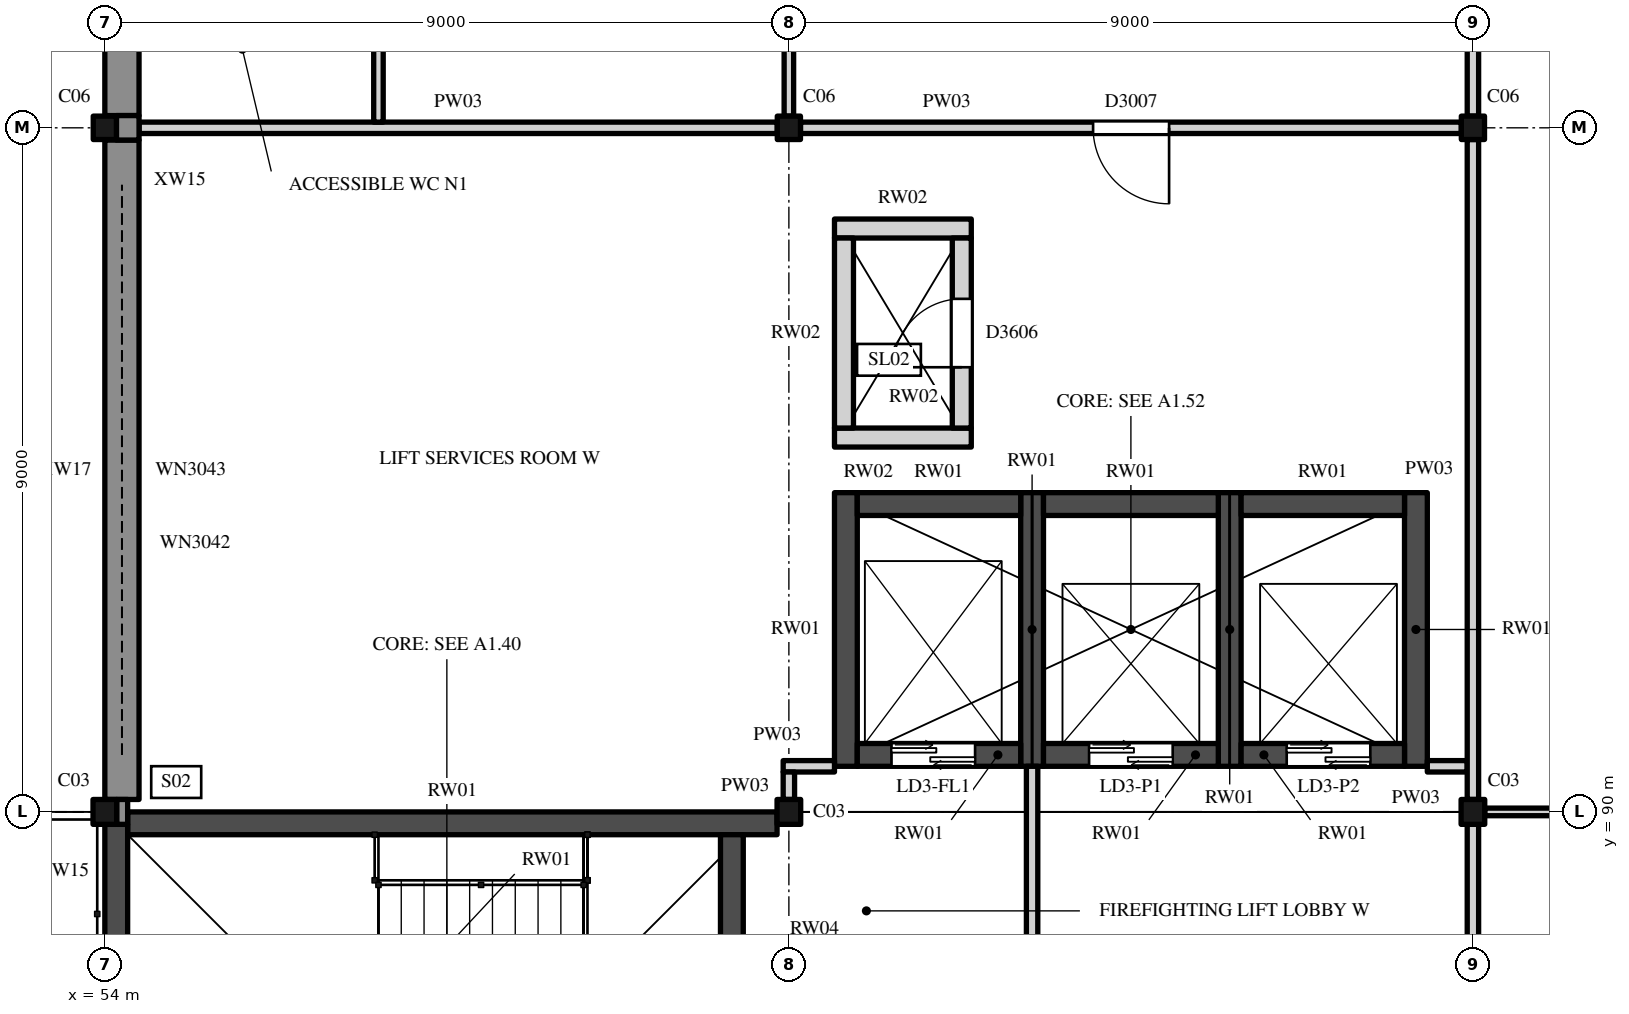
"""IFC4 building model, lengths in metres.
Left out: names, types, materials, properties, quantities, classifications, styles, units other than length and angle.
Written with IfcOpenShell. Run it as: python <this file> out.ifc"""

import sys

from ifc_helpers import new_model, si_unit, direction, frame, frame_2d, origin, origin_2d, place, context, subcontext, project, spatial, rectangle, i_section, extrude, element, fill, save


model = new_model("IFC4")
c1 = context("Model", 3, precision=1e-05, world=origin(), true_north=direction((0.0, 1.0)))
c2 = subcontext(c1, "Body", "Model", "MODEL_VIEW")
j1 = project(units=[si_unit("LENGTHUNIT", "METRE"), si_unit("PLANEANGLEUNIT", "RADIAN")], contexts=[c1])
p1 = place(None, origin())
s1 = spatial("IfcSite", under=j1, at=p1, CompositionType="ELEMENT")
p2 = place(p1, origin())
s2 = spatial("IfcBuilding", under=s1, at=p2, CompositionType="ELEMENT")
p3 = place(p2, frame((0.0, 0.0, 16.0)))
s3 = spatial("IfcBuildingStorey", under=s2, at=p3, CompositionType="ELEMENT", Elevation=16.0)
for number, where, z_axis, x_axis in (
    (1, (54.0, 90.0, 0.0), (0.0, 0.0, 1.0), (1.0, 0.0, 0.0)),
    (2, (63.0, 90.0, 0.0), (0.0, 0.0, 1.0), (1.0, 0.0, 0.0)),
    (3, (72.0, 90.0, 0.0), (0.0, 0.0, 1.0), (1.0, 0.0, 0.0)),
):
    element("IfcColumn", number, at=place(p3, frame(where, z_axis=z_axis, x_axis=x_axis)), inside=s3, PredefinedType="COLUMN", context=c2, shape_type="SweptSolid", body=[
        extrude(i_section(OverallWidth=0.311, OverallDepth=0.327, WebThickness=0.016, FlangeThickness=0.025, FilletRadius=0.017, at=origin_2d()), origin(), (0.0, 0.0, 1.0), 10.0),
    ])
for number, where, z_axis, x_axis in (
    (4, (54.0, 99.0, 0.0), (0.0, 0.0, 1.0), (1.0, 0.0, 0.0)),
    (5, (63.0, 99.0, 0.0), (0.0, 0.0, 1.0), (1.0, 0.0, 0.0)),
    (6, (72.0, 99.0, 0.0), (0.0, 0.0, 1.0), (1.0, 0.0, 0.0)),
):
    element("IfcColumn", number, at=place(p3, frame(where, z_axis=z_axis, x_axis=x_axis)), inside=s3, PredefinedType="COLUMN", context=c2, shape_type="SweptSolid", body=[
        extrude(i_section(OverallWidth=0.305, OverallDepth=0.308, WebThickness=0.01, FlangeThickness=0.015, FilletRadius=0.017, at=origin_2d()), origin(), (0.0, 0.0, 1.0), 10.0),
    ])
p4 = place(p3, frame((54.3, 89.85, 0.0), z_axis=(0.0, 0.0, 1.0), x_axis=(1.0, 0.0, 0.0)))
e7 = element("IfcWall", 7, at=p4, inside=s3, PredefinedType="SHEAR", context=c2, shape_type="SweptSolid", body=[
    extrude(rectangle(XDim=8.544, YDim=0.3, at=frame_2d((4.272, 0.0))), origin(), (0.0, 0.0, 1.0), 10.0),
])
p5 = place(p3, frame((54.15, 81.125, 0.0), z_axis=(0.0, 0.0, 1.0), x_axis=(0.0, 1.0, 0.0)))
e8 = element("IfcWall", 8, at=p5, inside=s3, PredefinedType="SHEAR", context=c2, shape_type="SweptSolid", body=[
    extrude(rectangle(XDim=8.711, YDim=0.3, at=frame_2d((4.356, 0.0))), origin(), (0.0, 0.0, 1.0), 10.0),
])
p6 = place(p3, frame((62.25, 81.9, 0.0), z_axis=(0.0, 0.0, 1.0), x_axis=(0.0, 1.0, 0.0)))
e9 = element("IfcWall", 9, at=p6, inside=s3, PredefinedType="SHEAR", context=c2, shape_type="SweptSolid", body=[
    extrude(rectangle(XDim=7.8, YDim=0.3, at=frame_2d((3.9, 0.0))), origin(), (0.0, 0.0, 1.0), 10.0),
])
p7 = place(p6, frame((3.0, 0.0, 0.0)))
e10 = element("IfcOpeningElement", 10, at=p7, cuts=e9, PredefinedType="OPENING", context=c2, shape_type="SweptSolid", body=[
    extrude(rectangle(XDim=1.2, YDim=2.1, at=frame_2d((0.6, 1.05))), frame((0.0, 0.16, 0.0), z_axis=(0.0, -1.0, 0.0), x_axis=(1.0, 0.0, 0.0)), (0.0, 0.0, 1.0), 0.32),
])
for number, where, z_axis, x_axis in (
    (11, (63.75, 90.6, 0.0), (0.0, 0.0, 1.0), (0.0, 1.0, 0.0)),
    (12, (66.2, 90.6, 0.0), (0.0, 0.0, 1.0), (0.0, 1.0, 0.0)),
    (13, (68.8, 90.6, 0.0), (0.0, 0.0, 1.0), (0.0, 1.0, 0.0)),
    (14, (71.25, 90.6, 0.0), (0.0, 0.0, 1.0), (0.0, 1.0, 0.0)),
):
    element("IfcWall", number, at=place(p3, frame(where, z_axis=z_axis, x_axis=x_axis)), inside=s3, PredefinedType="SHEAR", context=c2, shape_type="SweptSolid", body=[
        extrude(rectangle(XDim=3.6, YDim=0.3, at=frame_2d((1.8, 0.0))), origin(), (0.0, 0.0, 1.0), 10.0),
    ])
p8 = place(p3, frame((63.9, 90.75, 0.0), z_axis=(0.0, 0.0, 1.0), x_axis=(1.0, 0.0, 0.0)))
e15 = element("IfcWall", 15, at=p8, inside=s3, PredefinedType="SHEAR", context=c2, shape_type="SweptSolid", body=[
    extrude(rectangle(XDim=2.15, YDim=0.3, at=frame_2d((1.075, 0.0))), origin(), (0.0, 0.0, 1.0), 10.0),
])
p9 = place(p8, frame((0.45, 0.0, 0.0)))
e16 = element("IfcOpeningElement", 16, at=p9, cuts=e15, PredefinedType="OPENING", context=c2, shape_type="SweptSolid", body=[
    extrude(rectangle(XDim=1.1, YDim=2.1, at=frame_2d((0.55, 1.05))), frame((0.0, 0.16, 0.0), z_axis=(0.0, -1.0, 0.0), x_axis=(1.0, 0.0, 0.0)), (0.0, 0.0, 1.0), 0.32),
])
p10 = place(p3, frame((63.9, 94.05, 0.0), z_axis=(0.0, 0.0, 1.0), x_axis=(1.0, 0.0, 0.0)))
e17 = element("IfcWall", 17, at=p10, inside=s3, PredefinedType="SHEAR", context=c2, shape_type="SweptSolid", body=[
    extrude(rectangle(XDim=2.15, YDim=0.3, at=frame_2d((1.075, 0.0))), origin(), (0.0, 0.0, 1.0), 10.0),
])
p11 = place(p3, frame((66.35, 90.75, 0.0), z_axis=(0.0, 0.0, 1.0), x_axis=(1.0, 0.0, 0.0)))
e18 = element("IfcWall", 18, at=p11, inside=s3, PredefinedType="SHEAR", context=c2, shape_type="SweptSolid", body=[
    extrude(rectangle(XDim=2.3, YDim=0.3, at=frame_2d((1.15, 0.0))), origin(), (0.0, 0.0, 1.0), 10.0),
])
p12 = place(p11, frame((0.6, 0.0, 0.0)))
e19 = element("IfcOpeningElement", 19, at=p12, cuts=e18, PredefinedType="OPENING", context=c2, shape_type="SweptSolid", body=[
    extrude(rectangle(XDim=1.1, YDim=2.1, at=frame_2d((0.55, 1.05))), frame((0.0, 0.16, 0.0), z_axis=(0.0, -1.0, 0.0), x_axis=(1.0, 0.0, 0.0)), (0.0, 0.0, 1.0), 0.32),
])
p13 = place(p3, frame((66.35, 94.05, 0.0), z_axis=(0.0, 0.0, 1.0), x_axis=(1.0, 0.0, 0.0)))
e20 = element("IfcWall", 20, at=p13, inside=s3, PredefinedType="SHEAR", context=c2, shape_type="SweptSolid", body=[
    extrude(rectangle(XDim=2.3, YDim=0.3, at=frame_2d((1.15, 0.0))), origin(), (0.0, 0.0, 1.0), 10.0),
])
p14 = place(p3, frame((68.95, 90.75, 0.0), z_axis=(0.0, 0.0, 1.0), x_axis=(1.0, 0.0, 0.0)))
e21 = element("IfcWall", 21, at=p14, inside=s3, PredefinedType="SHEAR", context=c2, shape_type="SweptSolid", body=[
    extrude(rectangle(XDim=2.15, YDim=0.3, at=frame_2d((1.075, 0.0))), origin(), (0.0, 0.0, 1.0), 10.0),
])
p15 = place(p14, frame((0.6, 0.0, 0.0)))
e22 = element("IfcOpeningElement", 22, at=p15, cuts=e21, PredefinedType="OPENING", context=c2, shape_type="SweptSolid", body=[
    extrude(rectangle(XDim=1.1, YDim=2.1, at=frame_2d((0.55, 1.05))), frame((0.0, 0.16, 0.0), z_axis=(0.0, -1.0, 0.0), x_axis=(1.0, 0.0, 0.0)), (0.0, 0.0, 1.0), 0.32),
])
p16 = place(p3, frame((68.95, 94.05, 0.0), z_axis=(0.0, 0.0, 1.0), x_axis=(1.0, 0.0, 0.0)))
e23 = element("IfcWall", 23, at=p16, inside=s3, PredefinedType="SHEAR", context=c2, shape_type="SweptSolid", body=[
    extrude(rectangle(XDim=2.15, YDim=0.3, at=frame_2d((1.075, 0.0))), origin(), (0.0, 0.0, 1.0), 10.0),
])
for number, where, z_axis, x_axis in (
    (24, (63.6, 94.925, 0.0), (0.0, 0.0, 1.0), (1.0, 0.0, 0.0)),
    (25, (63.6, 97.675, 0.0), (0.0, 0.0, 1.0), (1.0, 0.0, 0.0)),
):
    element("IfcWall", number, at=place(p3, frame(where, z_axis=z_axis, x_axis=x_axis)), inside=s3, PredefinedType="STANDARD", context=c2, shape_type="SweptSolid", body=[
        extrude(rectangle(XDim=1.8, YDim=0.25, at=frame_2d((0.9, 0.0))), origin(), (0.0, 0.0, 1.0), 10.0),
    ])
p17 = place(p3, frame((63.725, 95.05, 0.0), z_axis=(0.0, 0.0, 1.0), x_axis=(0.0, 1.0, 0.0)))
e26 = element("IfcWall", 26, at=p17, inside=s3, PredefinedType="STANDARD", context=c2, shape_type="SweptSolid", body=[
    extrude(rectangle(XDim=2.5, YDim=0.25, at=frame_2d((1.25, 0.0))), origin(), (0.0, 0.0, 1.0), 10.0),
])
p18 = place(p3, frame((65.275, 95.05, 0.0), z_axis=(0.0, 0.0, 1.0), x_axis=(0.0, 1.0, 0.0)))
e27 = element("IfcWall", 27, at=p18, inside=s3, PredefinedType="STANDARD", context=c2, shape_type="SweptSolid", body=[
    extrude(rectangle(XDim=2.5, YDim=0.25, at=frame_2d((1.25, 0.0))), origin(), (0.0, 0.0, 1.0), 10.0),
])
p19 = place(p18, frame((0.8, 0.0, 0.0)))
e28 = element("IfcOpeningElement", 28, at=p19, cuts=e27, PredefinedType="OPENING", context=c2, shape_type="SweptSolid", body=[
    extrude(rectangle(XDim=0.9, YDim=2.1, at=frame_2d((0.45, 1.05))), frame((0.0, 0.135, 0.0), z_axis=(0.0, -1.0, 0.0), x_axis=(1.0, 0.0, 0.0)), (0.0, 0.0, 1.0), 0.27),
])
p20 = place(p3, frame((54.225, 90.164, 0.0), z_axis=(0.0, 0.0, 1.0), x_axis=(0.0, 1.0, 0.0)))
e29 = element("IfcWall", 29, at=p20, inside=s3, PredefinedType="SOLIDWALL", context=c2, shape_type="SweptSolid", body=[
    extrude(rectangle(XDim=8.676, YDim=0.45, at=frame_2d((4.338, 0.0))), origin(), (0.0, 0.0, 1.0), 9.371),
])
p21 = place(p20, frame((0.586, 0.0, 6.4)))
e30 = element("IfcOpeningElement", 30, at=p21, cuts=e29, PredefinedType="OPENING", context=c2, shape_type="SweptSolid", body=[
    extrude(rectangle(XDim=7.5, YDim=1.2, at=frame_2d((3.75, 0.6))), frame((0.0, 0.235, 0.0), z_axis=(0.0, -1.0, 0.0), x_axis=(1.0, 0.0, 0.0)), (0.0, 0.0, 1.0), 0.47),
])
p22 = place(p20, frame((0.586, 0.0, 1.6)))
e31 = element("IfcOpeningElement", 31, at=p22, cuts=e29, PredefinedType="OPENING", context=c2, shape_type="SweptSolid", body=[
    extrude(rectangle(XDim=7.5, YDim=1.2, at=frame_2d((3.75, 0.6))), frame((0.0, 0.235, 0.0), z_axis=(0.0, -1.0, 0.0), x_axis=(1.0, 0.0, 0.0)), (0.0, 0.0, 1.0), 0.47),
])
p23 = place(p3, frame((54.225, 99.161, 0.0), z_axis=(0.0, 0.0, 1.0), x_axis=(0.0, 1.0, 0.0)))
e32 = element("IfcWall", 32, at=p23, inside=s3, PredefinedType="SOLIDWALL", context=c2, shape_type="SweptSolid", body=[
    extrude(rectangle(XDim=8.678, YDim=0.45, at=frame_2d((4.339, 0.0))), origin(), (0.0, 0.0, 1.0), 9.371),
])
p24 = place(p3, frame((54.228, 89.836, 0.0), z_axis=(0.0, 0.0, 1.0), x_axis=(0.0, 1.0, 0.0)))
e33 = element("IfcWall", 33, at=p24, inside=s3, PredefinedType="SOLIDWALL", context=c2, shape_type="SweptSolid", body=[
    extrude(rectangle(XDim=0.327, YDim=0.145, at=frame_2d((0.164, 0.0))), origin(), (0.0, 0.0, 1.0), 10.0),
])
p25 = place(p3, frame((54.301, 98.839, 0.0), z_axis=(0.0, 0.0, 1.0), x_axis=(0.0, 1.0, 0.0)))
e34 = element("IfcWall", 34, at=p25, inside=s3, PredefinedType="SOLIDWALL", context=c2, shape_type="SweptSolid", body=[
    extrude(rectangle(XDim=0.322, YDim=0.298, at=frame_2d((0.161, 0.0))), origin(), (0.0, 0.0, 1.0), 9.371),
])
p26 = place(p3, frame((72.156, 90.0, 0.0), z_axis=(0.0, 0.0, 1.0), x_axis=(1.0, 0.0, 0.0)))
e35 = element("IfcWall", 35, at=p26, inside=s3, PredefinedType="PARTITIONING", context=c2, shape_type="SweptSolid", body=[
    extrude(rectangle(XDim=8.689, YDim=0.1, at=frame_2d((4.344, 0.0))), origin(), (0.0, 0.0, 1.0), 9.473),
])
p27 = place(p26, frame((3.45, 0.0, 0.0)))
e36 = element("IfcOpeningElement", 36, at=p27, cuts=e35, PredefinedType="OPENING", context=c2, shape_type="SweptSolid", body=[
    extrude(rectangle(XDim=1.8, YDim=2.4, at=frame_2d((0.9, 1.2))), frame((0.0, 0.06, 0.0), z_axis=(0.0, -1.0, 0.0), x_axis=(1.0, 0.0, 0.0)), (0.0, 0.0, 1.0), 0.12),
])
p28 = place(p3, frame((62.925, 90.6, 0.0), z_axis=(0.0, 0.0, 1.0), x_axis=(1.0, 0.0, 0.0)))
e37 = element("IfcWall", 37, at=p28, inside=s3, PredefinedType="PARTITIONING", context=c2, shape_type="SweptSolid", body=[
    extrude(rectangle(XDim=0.675, YDim=0.15, at=frame_2d((0.337, 0.0))), origin(), (0.0, 0.0, 1.0), 9.825),
])
p29 = place(p3, frame((71.4, 90.6, 0.0), z_axis=(0.0, 0.0, 1.0), x_axis=(1.0, 0.0, 0.0)))
e38 = element("IfcWall", 38, at=p29, inside=s3, PredefinedType="PARTITIONING", context=c2, shape_type="SweptSolid", body=[
    extrude(rectangle(XDim=0.525, YDim=0.15, at=frame_2d((0.263, 0.0))), origin(), (0.0, 0.0, 1.0), 9.825),
])
p30 = place(p3, frame((54.45, 99.0, 0.0), z_axis=(0.0, 0.0, 1.0), x_axis=(1.0, 0.0, 0.0)))
e39 = element("IfcWall", 39, at=p30, inside=s3, PredefinedType="PARTITIONING", context=c2, shape_type="SweptSolid", body=[
    extrude(rectangle(XDim=8.397, YDim=0.15, at=frame_2d((4.199, 0.0))), origin(), (0.0, 0.0, 1.0), 9.473),
])
p31 = place(p3, frame((63.153, 99.0, 0.0), z_axis=(0.0, 0.0, 1.0), x_axis=(1.0, 0.0, 0.0)))
e40 = element("IfcWall", 40, at=p31, inside=s3, PredefinedType="PARTITIONING", context=c2, shape_type="SweptSolid", body=[
    extrude(rectangle(XDim=8.695, YDim=0.15, at=frame_2d((4.347, 0.0))), origin(), (0.0, 0.0, 1.0), 9.473),
])
p32 = place(p31, frame((3.85, 0.0, 0.0)))
e41 = element("IfcOpeningElement", 41, at=p32, cuts=e40, PredefinedType="OPENING", context=c2, shape_type="SweptSolid", body=[
    extrude(rectangle(XDim=1.0, YDim=2.4, at=frame_2d((0.5, 1.2))), frame((0.0, 0.085, 0.0), z_axis=(0.0, -1.0, 0.0), x_axis=(1.0, 0.0, 0.0)), (0.0, 0.0, 1.0), 0.17),
])
p33 = place(p3, frame((57.6, 99.075, 0.0), z_axis=(0.0, 0.0, 1.0), x_axis=(0.0, 1.0, 0.0)))
e42 = element("IfcWall", 42, at=p33, inside=s3, PredefinedType="PARTITIONING", context=c2, shape_type="SweptSolid", body=[
    extrude(rectangle(XDim=2.863, YDim=0.125, at=frame_2d((1.431, 0.0))), origin(), (0.0, 0.0, 1.0), 9.825),
])
p34 = place(p3, frame((63.0, 90.164, 0.0), z_axis=(0.0, 0.0, 1.0), x_axis=(0.0, 1.0, 0.0)))
e43 = element("IfcWall", 43, at=p34, inside=s3, PredefinedType="PARTITIONING", context=c2, shape_type="SweptSolid", body=[
    extrude(rectangle(XDim=0.361, YDim=0.15, at=frame_2d((0.181, 0.0))), origin(), (0.0, 0.0, 1.0), 9.825),
])
p35 = place(p3, frame((63.0, 99.154, 0.0), z_axis=(0.0, 0.0, 1.0), x_axis=(0.0, 1.0, 0.0)))
e44 = element("IfcWall", 44, at=p35, inside=s3, PredefinedType="PARTITIONING", context=c2, shape_type="SweptSolid", body=[
    extrude(rectangle(XDim=2.783, YDim=0.125, at=frame_2d((1.392, 0.0))), origin(), (0.0, 0.0, 1.0), 9.371),
])
p36 = place(p3, frame((66.2, 84.075, 0.0), z_axis=(0.0, 0.0, 1.0), x_axis=(0.0, 1.0, 0.0)))
e45 = element("IfcWall", 45, at=p36, inside=s3, PredefinedType="PARTITIONING", context=c2, shape_type="SweptSolid", body=[
    extrude(rectangle(XDim=6.525, YDim=0.15, at=frame_2d((3.263, 0.0))), origin(), (0.0, 0.0, 1.0), 9.825),
])
p37 = place(p36, frame((2.85, 0.0, 0.0)))
e46 = element("IfcOpeningElement", 46, at=p37, cuts=e45, PredefinedType="OPENING", context=c2, shape_type="SweptSolid", body=[
    extrude(rectangle(XDim=0.9, YDim=2.1, at=frame_2d((0.45, 1.05))), frame((0.0, 0.085, 0.0), z_axis=(0.0, -1.0, 0.0), x_axis=(1.0, 0.0, 0.0)), (0.0, 0.0, 1.0), 0.17),
])
p38 = place(p3, frame((72.0, 84.075, 0.0), z_axis=(0.0, 0.0, 1.0), x_axis=(0.0, 1.0, 0.0)))
e47 = element("IfcWall", 47, at=p38, inside=s3, PredefinedType="PARTITIONING", context=c2, shape_type="SweptSolid", body=[
    extrude(rectangle(XDim=5.761, YDim=0.15, at=frame_2d((2.881, 0.0))), origin(), (0.0, 0.0, 1.0), 9.371),
])
p39 = place(p3, frame((72.0, 90.164, 0.0), z_axis=(0.0, 0.0, 1.0), x_axis=(0.0, 1.0, 0.0)))
e48 = element("IfcWall", 48, at=p39, inside=s3, PredefinedType="PARTITIONING", context=c2, shape_type="SweptSolid", body=[
    extrude(rectangle(XDim=8.682, YDim=0.15, at=frame_2d((4.341, 0.0))), origin(), (0.0, 0.0, 1.0), 9.371),
])
p40 = place(p3, frame((72.0, 99.154, 0.0), z_axis=(0.0, 0.0, 1.0), x_axis=(0.0, 1.0, 0.0)))
e49 = element("IfcWall", 49, at=p40, inside=s3, PredefinedType="PARTITIONING", context=c2, shape_type="SweptSolid", body=[
    extrude(rectangle(XDim=5.771, YDim=0.15, at=frame_2d((2.885, 0.0))), origin(), (0.0, 0.0, 1.0), 9.371),
])
p41 = place(p9, origin())
e50 = element("IfcDoor", 50, at=p41, inside=s3, OperationType="DOUBLE_DOOR_SLIDING", PredefinedType="DOOR", context=c2, shape_type="SweptSolid", body=[
    extrude(rectangle(XDim=1.1, YDim=2.1, at=frame_2d((0.55, 1.05))), frame((0.0, 0.025, 0.0), z_axis=(0.0, -1.0, 0.0), x_axis=(1.0, 0.0, 0.0)), (0.0, 0.0, 1.0), 0.05),
])
fill(e16, e50)
p42 = place(p12, origin())
e51 = element("IfcDoor", 51, at=p42, inside=s3, OperationType="DOUBLE_DOOR_SLIDING", PredefinedType="DOOR", context=c2, shape_type="SweptSolid", body=[
    extrude(rectangle(XDim=1.1, YDim=2.1, at=frame_2d((0.55, 1.05))), frame((0.0, 0.025, 0.0), z_axis=(0.0, -1.0, 0.0), x_axis=(1.0, 0.0, 0.0)), (0.0, 0.0, 1.0), 0.05),
])
fill(e19, e51)
p43 = place(p15, origin())
e52 = element("IfcDoor", 52, at=p43, inside=s3, OperationType="DOUBLE_DOOR_SLIDING", PredefinedType="DOOR", context=c2, shape_type="SweptSolid", body=[
    extrude(rectangle(XDim=1.1, YDim=2.1, at=frame_2d((0.55, 1.05))), frame((0.0, 0.025, 0.0), z_axis=(0.0, -1.0, 0.0), x_axis=(1.0, 0.0, 0.0)), (0.0, 0.0, 1.0), 0.05),
])
fill(e22, e52)
p44 = place(p19, origin())
e53 = element("IfcDoor", 53, at=p44, inside=s3, OperationType="SINGLE_SWING_RIGHT", PredefinedType="DOOR", context=c2, shape_type="SweptSolid", body=[
    extrude(rectangle(XDim=0.9, YDim=2.1, at=frame_2d((0.45, 1.05))), frame((0.0, 0.025, 0.0), z_axis=(0.0, -1.0, 0.0), x_axis=(1.0, 0.0, 0.0)), (0.0, 0.0, 1.0), 0.05),
])
fill(e28, e53)
p45 = place(p21, origin())
e54 = element("IfcWindow", 54, at=p45, inside=s3, PartitioningType="SINGLE_PANEL", PredefinedType="WINDOW", context=c2, shape_type="SweptSolid", body=[
    extrude(rectangle(XDim=7.5, YDim=1.2, at=frame_2d((3.75, 0.6))), frame((0.0, 0.03, 0.0), z_axis=(0.0, -1.0, 0.0), x_axis=(1.0, 0.0, 0.0)), (0.0, 0.0, 1.0), 0.06),
])
fill(e30, e54)
p46 = place(p22, origin())
e55 = element("IfcWindow", 55, at=p46, inside=s3, PartitioningType="SINGLE_PANEL", PredefinedType="WINDOW", context=c2, shape_type="SweptSolid", body=[
    extrude(rectangle(XDim=7.5, YDim=1.2, at=frame_2d((3.75, 0.6))), frame((0.0, 0.03, 0.0), z_axis=(0.0, -1.0, 0.0), x_axis=(1.0, 0.0, 0.0)), (0.0, 0.0, 1.0), 0.06),
])
fill(e31, e55)
p47 = place(p32, origin())
e56 = element("IfcDoor", 56, at=p47, inside=s3, OperationType="SINGLE_SWING_RIGHT", PredefinedType="DOOR", context=c2, shape_type="SweptSolid", body=[
    extrude(rectangle(XDim=1.0, YDim=2.4, at=frame_2d((0.5, 1.2))), frame((0.0, 0.025, 0.0), z_axis=(0.0, -1.0, 0.0), x_axis=(1.0, 0.0, 0.0)), (0.0, 0.0, 1.0), 0.05),
])
fill(e41, e56)
save(model, sys.argv[1])
